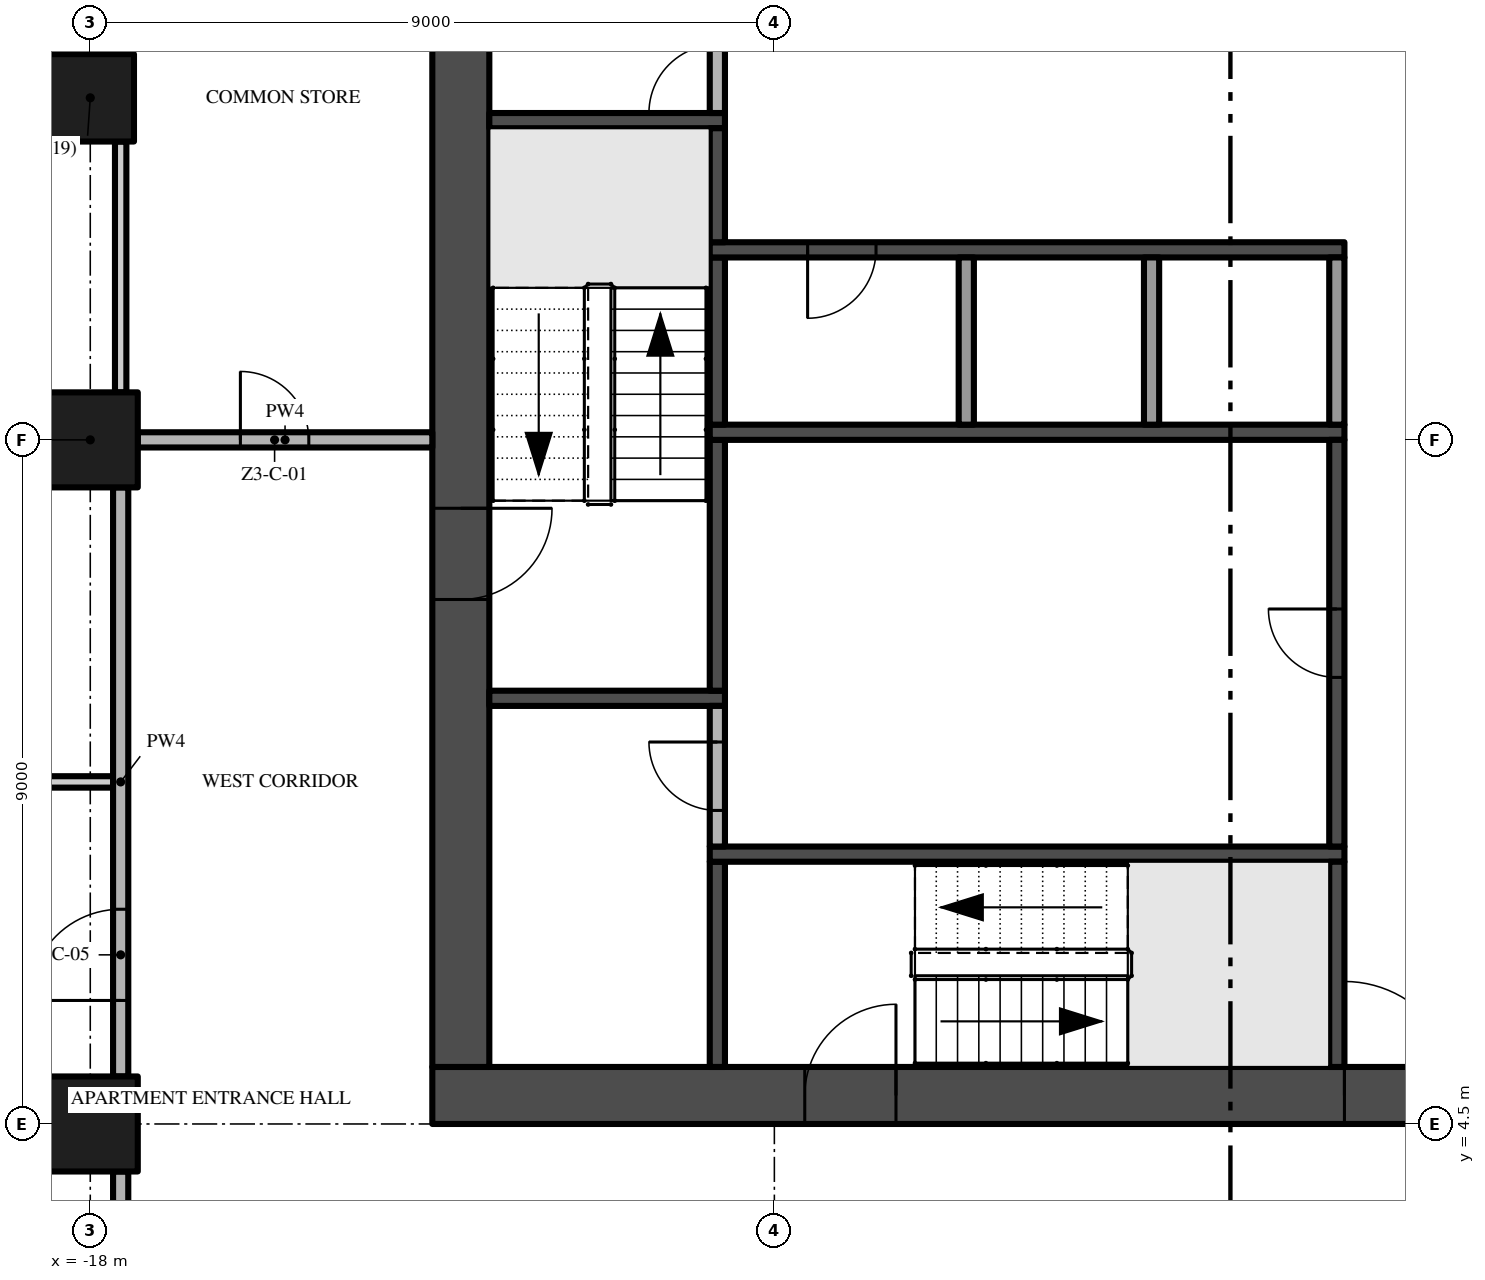
"""IFC4 building model, lengths in metres.
Left out: names, types, materials, properties, quantities, classifications, styles, units other than length and angle.
Written with IfcOpenShell. Run it as: python <this file> out.ifc"""

import sys

from ifc_helpers import new_model, si_unit, direction, frame, frame_2d, origin, origin_2d, place, context, subcontext, project, spatial, rectangle, extrude, element, fill, save


model = new_model("IFC4")
c1 = context("Model", 3, precision=1e-05, world=origin(), true_north=direction((0.0, 1.0)))
c2 = subcontext(c1, "Body", "Model", "MODEL_VIEW")
j1 = project(units=[si_unit("LENGTHUNIT", "METRE"), si_unit("PLANEANGLEUNIT", "RADIAN")], contexts=[c1])
p1 = place(None, origin())
s1 = spatial("IfcSite", under=j1, at=p1, CompositionType="ELEMENT")
p2 = place(p1, origin())
s2 = spatial("IfcBuilding", under=s1, at=p2, CompositionType="ELEMENT")
p3 = place(p2, frame((0.0, 0.0, 155.4)))
s3 = spatial("IfcBuildingStorey", under=s2, at=p3, CompositionType="ELEMENT", Elevation=155.4)
p4 = place(p3, frame((-13.5, 4.875, -0.3), z_axis=(0.0, 0.0, 1.0), x_axis=(1.0, 0.0, 0.0)))
e1 = element("IfcWall", 1, at=p4, inside=s3, PredefinedType="SHEAR", context=c2, shape_type="SweptSolid", body=[
    extrude(rectangle(XDim=27.0, YDim=0.75, at=frame_2d((13.5, 0.0))), origin(), (0.0, 0.0, 1.0), 3.8),
])
p5 = place(p4, frame((12.0, 0.0, 0.3)))
e2 = element("IfcOpeningElement", 2, at=p5, cuts=e1, PredefinedType="OPENING", context=c2, shape_type="SweptSolid", body=[
    extrude(rectangle(XDim=3.0, YDim=2.4, at=frame_2d((1.5, 1.2))), frame((0.0, 0.385, 0.0), z_axis=(0.0, -1.0, 0.0), x_axis=(1.0, 0.0, 0.0)), (0.0, 0.0, 1.0), 0.77),
])
p6 = place(p4, frame((4.9, 0.0, 0.3)))
e3 = element("IfcOpeningElement", 3, at=p6, cuts=e1, PredefinedType="OPENING", context=c2, shape_type="SweptSolid", body=[
    extrude(rectangle(XDim=1.2, YDim=2.2, at=frame_2d((0.6, 1.1))), frame((0.0, 0.385, 0.0), z_axis=(0.0, -1.0, 0.0), x_axis=(1.0, 0.0, 0.0)), (0.0, 0.0, 1.0), 0.77),
])
p7 = place(p4, frame((20.75, 0.0, 0.3)))
e4 = element("IfcOpeningElement", 4, at=p7, cuts=e1, PredefinedType="OPENING", context=c2, shape_type="SweptSolid", body=[
    extrude(rectangle(XDim=1.5, YDim=2.2, at=frame_2d((0.75, 1.1))), frame((0.0, 0.385, 0.0), z_axis=(0.0, -1.0, 0.0), x_axis=(1.0, 0.0, 0.0)), (0.0, 0.0, 1.0), 0.77),
])
p8 = place(p4, frame((17.4, 0.0, 0.3)))
e5 = element("IfcOpeningElement", 5, at=p8, cuts=e1, PredefinedType="OPENING", context=c2, shape_type="SweptSolid", body=[
    extrude(rectangle(XDim=1.2, YDim=2.2, at=frame_2d((0.6, 1.1))), frame((0.0, 0.385, 0.0), z_axis=(0.0, -1.0, 0.0), x_axis=(1.0, 0.0, 0.0)), (0.0, 0.0, 1.0), 0.77),
])
p9 = place(p3, frame((-13.125, 21.75, -0.3), z_axis=(0.0, 0.0, 1.0), x_axis=(0.0, -1.0, 0.0)))
e6 = element("IfcWall", 6, at=p9, inside=s3, PredefinedType="SHEAR", context=c2, shape_type="SweptSolid", body=[
    extrude(rectangle(XDim=16.5, YDim=0.75, at=frame_2d((8.25, 0.0))), origin(), (0.0, 0.0, 1.0), 3.8),
])
p10 = place(p9, frame((9.15, 0.0, 0.3)))
e7 = element("IfcOpeningElement", 7, at=p10, cuts=e6, PredefinedType="OPENING", context=c2, shape_type="SweptSolid", body=[
    extrude(rectangle(XDim=1.2, YDim=2.2, at=frame_2d((0.6, 1.1))), frame((0.0, 0.385, 0.0), z_axis=(0.0, -1.0, 0.0), x_axis=(1.0, 0.0, 0.0)), (0.0, 0.0, 1.0), 0.77),
])
for number, where, z_axis, x_axis in (
    (8, (-18.0, 13.5, 0.0), (0.0, 0.0, 1.0), (1.0, 0.0, 0.0)),
    (9, (-18.0, 4.5, 0.0), (0.0, 0.0, 1.0), (1.0, 0.0, 0.0)),
):
    element("IfcColumn", number, at=place(p3, frame(where, z_axis=z_axis, x_axis=x_axis)), inside=s3, PredefinedType="COLUMN", context=c2, shape_type="SweptSolid", body=[
        extrude(rectangle(XDim=1.25, YDim=1.25, at=origin_2d()), origin(), (0.0, 0.0, 1.0), 3.5),
    ])
p11 = place(p3, frame((-18.0, 18.0, 0.0), z_axis=(0.0, 0.0, 1.0), x_axis=(1.0, 0.0, 0.0)))
e10 = element("IfcColumn", 10, at=p11, inside=s3, PredefinedType="COLUMN", context=c2, shape_type="SweptSolid", body=[
    extrude(rectangle(XDim=1.15, YDim=1.15, at=origin_2d()), origin(), (0.0, 0.0, 1.0), 3.5),
])
for number, where, z_axis, x_axis in (
    (11, (-12.75, 10.1, 0.0), (0.0, 0.0, 1.0), (1.0, 0.0, 0.0)),
    (12, (-12.75, 17.7, 0.0), (0.0, 0.0, 1.0), (1.0, 0.0, 0.0)),
):
    element("IfcWall", number, at=place(p3, frame(where, z_axis=z_axis, x_axis=x_axis)), inside=s3, PredefinedType="SHEAR", context=c2, shape_type="SweptSolid", body=[
        extrude(rectangle(XDim=3.1, YDim=0.2, at=frame_2d((1.55, 0.0))), origin(), (0.0, 0.0, 1.0), 3.5),
    ])
p12 = place(p3, frame((-9.75, 5.25, 0.0), z_axis=(0.0, 0.0, 1.0), x_axis=(0.0, 1.0, 0.0)))
e13 = element("IfcWall", 13, at=p12, inside=s3, PredefinedType="SHEAR", context=c2, shape_type="SweptSolid", body=[
    extrude(rectangle(XDim=2.7, YDim=0.2, at=frame_2d((1.35, 0.0))), origin(), (0.0, 0.0, 1.0), 3.5),
])
p13 = place(p3, frame((-9.85, 8.05, 0.0), z_axis=(0.0, 0.0, 1.0), x_axis=(1.0, 0.0, 0.0)))
e14 = element("IfcWall", 14, at=p13, inside=s3, PredefinedType="SHEAR", context=c2, shape_type="SweptSolid", body=[
    extrude(rectangle(XDim=8.35, YDim=0.2, at=frame_2d((4.175, 0.0))), origin(), (0.0, 0.0, 1.0), 3.5),
])
p14 = place(p3, frame((-9.75, 8.15, 0.0), z_axis=(0.0, 0.0, 1.0), x_axis=(0.0, 1.0, 0.0)))
e15 = element("IfcWall", 15, at=p14, inside=s3, PredefinedType="PARTITIONING", context=c2, shape_type="SweptSolid", body=[
    extrude(rectangle(XDim=1.85, YDim=0.2, at=frame_2d((0.925, 0.0))), origin(), (0.0, 0.0, 1.0), 3.5),
])
p15 = place(p14, frame((0.475, 0.0, 0.0)))
e16 = element("IfcOpeningElement", 16, at=p15, cuts=e15, PredefinedType="OPENING", context=c2, shape_type="SweptSolid", body=[
    extrude(rectangle(XDim=0.9, YDim=2.1, at=frame_2d((0.45, 1.05))), frame((0.0, 0.11, 0.0), z_axis=(0.0, -1.0, 0.0), x_axis=(1.0, 0.0, 0.0)), (0.0, 0.0, 1.0), 0.22),
])
p16 = place(p3, frame((-9.75, 10.2, 0.0), z_axis=(0.0, 0.0, 1.0), x_axis=(0.0, 1.0, 0.0)))
e17 = element("IfcWall", 17, at=p16, inside=s3, PredefinedType="SHEAR", context=c2, shape_type="SweptSolid", body=[
    extrude(rectangle(XDim=3.3, YDim=0.2, at=frame_2d((1.65, 0.0))), origin(), (0.0, 0.0, 1.0), 3.5),
])
p17 = place(p3, frame((-9.85, 13.6, 0.0), z_axis=(0.0, 0.0, 1.0), x_axis=(1.0, 0.0, 0.0)))
e18 = element("IfcWall", 18, at=p17, inside=s3, PredefinedType="SHEAR", context=c2, shape_type="SweptSolid", body=[
    extrude(rectangle(XDim=8.35, YDim=0.2, at=frame_2d((4.175, 0.0))), origin(), (0.0, 0.0, 1.0), 3.5),
])
p18 = place(p3, frame((-9.75, 13.7, 0.0), z_axis=(0.0, 0.0, 1.0), x_axis=(0.0, 1.0, 0.0)))
e19 = element("IfcWall", 19, at=p18, inside=s3, PredefinedType="SHEAR", context=c2, shape_type="SweptSolid", body=[
    extrude(rectangle(XDim=2.2, YDim=0.2, at=frame_2d((1.1, 0.0))), origin(), (0.0, 0.0, 1.0), 3.5),
])
p19 = place(p3, frame((-1.5, 16.0, 0.0), z_axis=(0.0, 0.0, 1.0), x_axis=(-1.0, 0.0, 0.0)))
e20 = element("IfcWall", 20, at=p19, inside=s3, PredefinedType="SHEAR", context=c2, shape_type="SweptSolid", body=[
    extrude(rectangle(XDim=8.35, YDim=0.2, at=frame_2d((4.175, 0.0))), origin(), (0.0, 0.0, 1.0), 3.5),
])
p20 = place(p19, frame((6.162, 0.0, 0.0)))
e21 = element("IfcOpeningElement", 21, at=p20, cuts=e20, PredefinedType="OPENING", context=c2, shape_type="SweptSolid", body=[
    extrude(rectangle(XDim=0.9, YDim=2.1, at=frame_2d((0.45, 1.05))), frame((0.0, 0.11, 0.0), z_axis=(0.0, -1.0, 0.0), x_axis=(1.0, 0.0, 0.0)), (0.0, 0.0, 1.0), 0.22),
])
p21 = place(p3, frame((-9.75, 16.1, 0.0), z_axis=(0.0, 0.0, 1.0), x_axis=(0.0, 1.0, 0.0)))
e22 = element("IfcWall", 22, at=p21, inside=s3, PredefinedType="SHEAR", context=c2, shape_type="SweptSolid", body=[
    extrude(rectangle(XDim=1.5, YDim=0.2, at=frame_2d((0.75, 0.0))), origin(), (0.0, 0.0, 1.0), 3.5),
])
p22 = place(p3, frame((-9.75, 17.8, 0.0), z_axis=(0.0, 0.0, 1.0), x_axis=(0.0, 1.0, 0.0)))
e23 = element("IfcWall", 23, at=p22, inside=s3, PredefinedType="PARTITIONING", context=c2, shape_type="SweptSolid", body=[
    extrude(rectangle(XDim=1.4, YDim=0.2, at=frame_2d((0.7, 0.0))), origin(), (0.0, 0.0, 1.0), 3.5),
])
p23 = place(p22, origin())
e24 = element("IfcOpeningElement", 24, at=p23, cuts=e23, PredefinedType="OPENING", context=c2, shape_type="SweptSolid", body=[
    extrude(rectangle(XDim=0.9, YDim=2.1, at=frame_2d((0.45, 1.05))), frame((0.0, 0.11, 0.0), z_axis=(0.0, -1.0, 0.0), x_axis=(1.0, 0.0, 0.0)), (0.0, 0.0, 1.0), 0.22),
])
for number, where, z_axis, x_axis in (
    (25, (-6.475, 13.7, 0.0), (0.0, 0.0, 1.0), (0.0, 1.0, 0.0)),
    (26, (-4.037, 13.7, 0.0), (0.0, 0.0, 1.0), (0.0, 1.0, 0.0)),
):
    element("IfcWall", number, at=place(p3, frame(where, z_axis=z_axis, x_axis=x_axis)), inside=s3, PredefinedType="PARTITIONING", context=c2, shape_type="SweptSolid", body=[
        extrude(rectangle(XDim=2.2, YDim=0.2, at=frame_2d((1.1, 0.0))), origin(), (0.0, 0.0, 1.0), 3.5),
    ])
p24 = place(p3, frame((-1.6, 5.25, 0.0), z_axis=(0.0, 0.0, 1.0), x_axis=(0.0, 1.0, 0.0)))
e27 = element("IfcWall", 27, at=p24, inside=s3, PredefinedType="SHEAR", context=c2, shape_type="SweptSolid", body=[
    extrude(rectangle(XDim=2.7, YDim=0.2, at=frame_2d((1.35, 0.0))), origin(), (0.0, 0.0, 1.0), 3.5),
])
p25 = place(p3, frame((-1.6, 8.15, 0.0), z_axis=(0.0, 0.0, 1.0), x_axis=(0.0, 1.0, 0.0)))
e28 = element("IfcWall", 28, at=p25, inside=s3, PredefinedType="SHEAR", context=c2, shape_type="SweptSolid", body=[
    extrude(rectangle(XDim=5.35, YDim=0.2, at=frame_2d((2.675, 0.0))), origin(), (0.0, 0.0, 1.0), 3.5),
])
p26 = place(p25, frame((2.225, 0.0, 0.0)))
e29 = element("IfcOpeningElement", 29, at=p26, cuts=e28, PredefinedType="OPENING", context=c2, shape_type="SweptSolid", body=[
    extrude(rectangle(XDim=0.9, YDim=2.1, at=frame_2d((0.45, 1.05))), frame((0.0, 0.11, 0.0), z_axis=(0.0, -1.0, 0.0), x_axis=(1.0, 0.0, 0.0)), (0.0, 0.0, 1.0), 0.22),
])
p27 = place(p3, frame((-1.6, 13.7, 0.0), z_axis=(0.0, 0.0, 1.0), x_axis=(0.0, 1.0, 0.0)))
e30 = element("IfcWall", 30, at=p27, inside=s3, PredefinedType="PARTITIONING", context=c2, shape_type="SweptSolid", body=[
    extrude(rectangle(XDim=2.2, YDim=0.2, at=frame_2d((1.1, 0.0))), origin(), (0.0, 0.0, 1.0), 3.5),
])
p28 = place(p3, frame((-22.2, 9.0, 0.0), z_axis=(0.0, 0.0, 1.0), x_axis=(1.0, 0.0, 0.0)))
e31 = element("IfcWall", 31, at=p28, inside=s3, PredefinedType="PARTITIONING", context=c2, shape_type="SweptSolid", body=[
    extrude(rectangle(XDim=4.5, YDim=0.15, at=frame_2d((2.25, 0.0))), origin(), (0.0, 0.0, 1.0), 3.5),
])
p29 = place(p28, frame((1.25, 0.0, 0.0)))
e32 = element("IfcOpeningElement", 32, at=p29, cuts=e31, PredefinedType="OPENING", context=c2, shape_type="SweptSolid", body=[
    extrude(rectangle(XDim=1.8, YDim=2.4, at=frame_2d((0.9, 1.2))), frame((0.0, 0.085, 0.0), z_axis=(0.0, -1.0, 0.0), x_axis=(1.0, 0.0, 0.0)), (0.0, 0.0, 1.0), 0.17),
])
p30 = place(p3, frame((-17.375, 13.5, 0.0), z_axis=(0.0, 0.0, 1.0), x_axis=(1.0, 0.0, 0.0)))
e33 = element("IfcWall", 33, at=p30, inside=s3, PredefinedType="PARTITIONING", context=c2, shape_type="SweptSolid", body=[
    extrude(rectangle(XDim=3.875, YDim=0.2, at=frame_2d((1.938, 0.0))), origin(), (0.0, 0.0, 1.0), 3.5),
])
p31 = place(p30, frame((1.35, 0.0, 0.0)))
e34 = element("IfcOpeningElement", 34, at=p31, cuts=e33, PredefinedType="OPENING", context=c2, shape_type="SweptSolid", body=[
    extrude(rectangle(XDim=0.9, YDim=2.1, at=frame_2d((0.45, 1.05))), frame((0.0, 0.11, 0.0), z_axis=(0.0, -1.0, 0.0), x_axis=(1.0, 0.0, 0.0)), (0.0, 0.0, 1.0), 0.22),
])
p32 = place(p3, frame((-17.6, -0.2, 0.0), z_axis=(0.0, 0.0, 1.0), x_axis=(0.0, 1.0, 0.0)))
e35 = element("IfcWall", 35, at=p32, inside=s3, PredefinedType="PARTITIONING", context=c2, shape_type="SweptSolid", body=[
    extrude(rectangle(XDim=4.075, YDim=0.2, at=frame_2d((2.038, 0.0))), origin(), (0.0, 0.0, 1.0), 3.5),
])
p33 = place(p3, frame((-17.6, 5.125, 0.0), z_axis=(0.0, 0.0, 1.0), x_axis=(0.0, 1.0, 0.0)))
e36 = element("IfcWall", 36, at=p33, inside=s3, PredefinedType="PARTITIONING", context=c2, shape_type="SweptSolid", body=[
    extrude(rectangle(XDim=7.75, YDim=0.2, at=frame_2d((3.875, 0.0))), origin(), (0.0, 0.0, 1.0), 3.5),
])
p34 = place(p33, frame((1.0, 0.0, 0.0)))
e37 = element("IfcOpeningElement", 37, at=p34, cuts=e36, PredefinedType="OPENING", context=c2, shape_type="SweptSolid", body=[
    extrude(rectangle(XDim=1.2, YDim=2.4, at=frame_2d((0.6, 1.2))), frame((0.0, 0.11, 0.0), z_axis=(0.0, -1.0, 0.0), x_axis=(1.0, 0.0, 0.0)), (0.0, 0.0, 1.0), 0.22),
])
p35 = place(p3, frame((-17.6, 14.125, 0.0), z_axis=(0.0, 0.0, 1.0), x_axis=(0.0, 1.0, 0.0)))
e38 = element("IfcWall", 38, at=p35, inside=s3, PredefinedType="PARTITIONING", context=c2, shape_type="SweptSolid", body=[
    extrude(rectangle(XDim=3.3, YDim=0.15, at=frame_2d((1.65, 0.0))), origin(), (0.0, 0.0, 1.0), 3.5),
])
p36 = place(p3, frame((-17.6, 18.575, 0.0), z_axis=(0.0, 0.0, 1.0), x_axis=(0.0, 1.0, 0.0)))
e39 = element("IfcWall", 39, at=p36, inside=s3, PredefinedType="PARTITIONING", context=c2, shape_type="SweptSolid", body=[
    extrude(rectangle(XDim=2.775, YDim=0.15, at=frame_2d((1.387, 0.0))), origin(), (0.0, 0.0, 1.0), 3.5),
])
p37 = place(p5, frame((3.0, 0.0, 0.0), z_axis=(0.0, 0.0, 1.0), x_axis=(-1.0, 0.0, 0.0)))
e40 = element("IfcDoor", 40, at=p37, inside=s3, OperationType="DOUBLE_DOOR_SINGLE_SWING", PredefinedType="DOOR", context=c2, shape_type="SweptSolid", body=[
    extrude(rectangle(XDim=3.0, YDim=2.4, at=frame_2d((1.5, 1.2))), frame((0.0, 0.025, 0.0), z_axis=(0.0, -1.0, 0.0), x_axis=(1.0, 0.0, 0.0)), (0.0, 0.0, 1.0), 0.05),
])
fill(e2, e40)
p38 = place(p10, frame((1.2, 0.0, 0.0), z_axis=(0.0, 0.0, 1.0), x_axis=(-1.0, 0.0, 0.0)))
e41 = element("IfcDoor", 41, at=p38, inside=s3, OperationType="SINGLE_SWING_RIGHT", PredefinedType="DOOR", context=c2, shape_type="SweptSolid", body=[
    extrude(rectangle(XDim=1.2, YDim=2.2, at=frame_2d((0.6, 1.1))), frame((0.0, 0.025, 0.0), z_axis=(0.0, -1.0, 0.0), x_axis=(1.0, 0.0, 0.0)), (0.0, 0.0, 1.0), 0.05),
])
fill(e7, e41)
p39 = place(p6, frame((1.2, 0.0, 0.0), z_axis=(0.0, 0.0, 1.0), x_axis=(-1.0, 0.0, 0.0)))
e42 = element("IfcDoor", 42, at=p39, inside=s3, OperationType="SINGLE_SWING_LEFT", PredefinedType="DOOR", context=c2, shape_type="SweptSolid", body=[
    extrude(rectangle(XDim=1.2, YDim=2.2, at=frame_2d((0.6, 1.1))), frame((0.0, 0.025, 0.0), z_axis=(0.0, -1.0, 0.0), x_axis=(1.0, 0.0, 0.0)), (0.0, 0.0, 1.0), 0.05),
])
fill(e3, e42)
p40 = place(p26, origin())
e43 = element("IfcDoor", 43, at=p40, inside=s3, OperationType="SINGLE_SWING_RIGHT", PredefinedType="DOOR", context=c2, shape_type="SweptSolid", body=[
    extrude(rectangle(XDim=0.9, YDim=2.1, at=frame_2d((0.45, 1.05))), frame((0.0, 0.025, 0.0), z_axis=(0.0, -1.0, 0.0), x_axis=(1.0, 0.0, 0.0)), (0.0, 0.0, 1.0), 0.05),
])
fill(e29, e43)
p41 = place(p20, origin())
e44 = element("IfcDoor", 44, at=p41, inside=s3, OperationType="SINGLE_SWING_RIGHT", PredefinedType="DOOR", context=c2, shape_type="SweptSolid", body=[
    extrude(rectangle(XDim=0.9, YDim=2.1, at=frame_2d((0.45, 1.05))), frame((0.0, 0.025, 0.0), z_axis=(0.0, -1.0, 0.0), x_axis=(1.0, 0.0, 0.0)), (0.0, 0.0, 1.0), 0.05),
])
fill(e21, e44)
p42 = place(p23, origin())
e45 = element("IfcDoor", 45, at=p42, inside=s3, OperationType="SINGLE_SWING_LEFT", PredefinedType="DOOR", context=c2, shape_type="SweptSolid", body=[
    extrude(rectangle(XDim=0.9, YDim=2.1, at=frame_2d((0.45, 1.05))), frame((0.0, 0.025, 0.0), z_axis=(0.0, -1.0, 0.0), x_axis=(1.0, 0.0, 0.0)), (0.0, 0.0, 1.0), 0.05),
])
fill(e24, e45)
p43 = place(p15, origin())
e46 = element("IfcDoor", 46, at=p43, inside=s3, OperationType="SINGLE_SWING_RIGHT", PredefinedType="DOOR", context=c2, shape_type="SweptSolid", body=[
    extrude(rectangle(XDim=0.9, YDim=2.1, at=frame_2d((0.45, 1.05))), frame((0.0, 0.025, 0.0), z_axis=(0.0, -1.0, 0.0), x_axis=(1.0, 0.0, 0.0)), (0.0, 0.0, 1.0), 0.05),
])
fill(e16, e46)
p44 = place(p31, origin())
e47 = element("IfcDoor", 47, at=p44, inside=s3, OperationType="SINGLE_SWING_LEFT", PredefinedType="DOOR", context=c2, shape_type="SweptSolid", body=[
    extrude(rectangle(XDim=0.9, YDim=2.1, at=frame_2d((0.45, 1.05))), frame((0.0, 0.025, 0.0), z_axis=(0.0, -1.0, 0.0), x_axis=(1.0, 0.0, 0.0)), (0.0, 0.0, 1.0), 0.05),
])
fill(e34, e47)
p45 = place(p34, origin())
e48 = element("IfcDoor", 48, at=p45, inside=s3, OperationType="SINGLE_SWING_LEFT", PredefinedType="DOOR", context=c2, shape_type="SweptSolid", body=[
    extrude(rectangle(XDim=1.2, YDim=2.4, at=frame_2d((0.6, 1.2))), frame((0.0, 0.025, 0.0), z_axis=(0.0, -1.0, 0.0), x_axis=(1.0, 0.0, 0.0)), (0.0, 0.0, 1.0), 0.05),
])
fill(e37, e48)
save(model, sys.argv[1])
